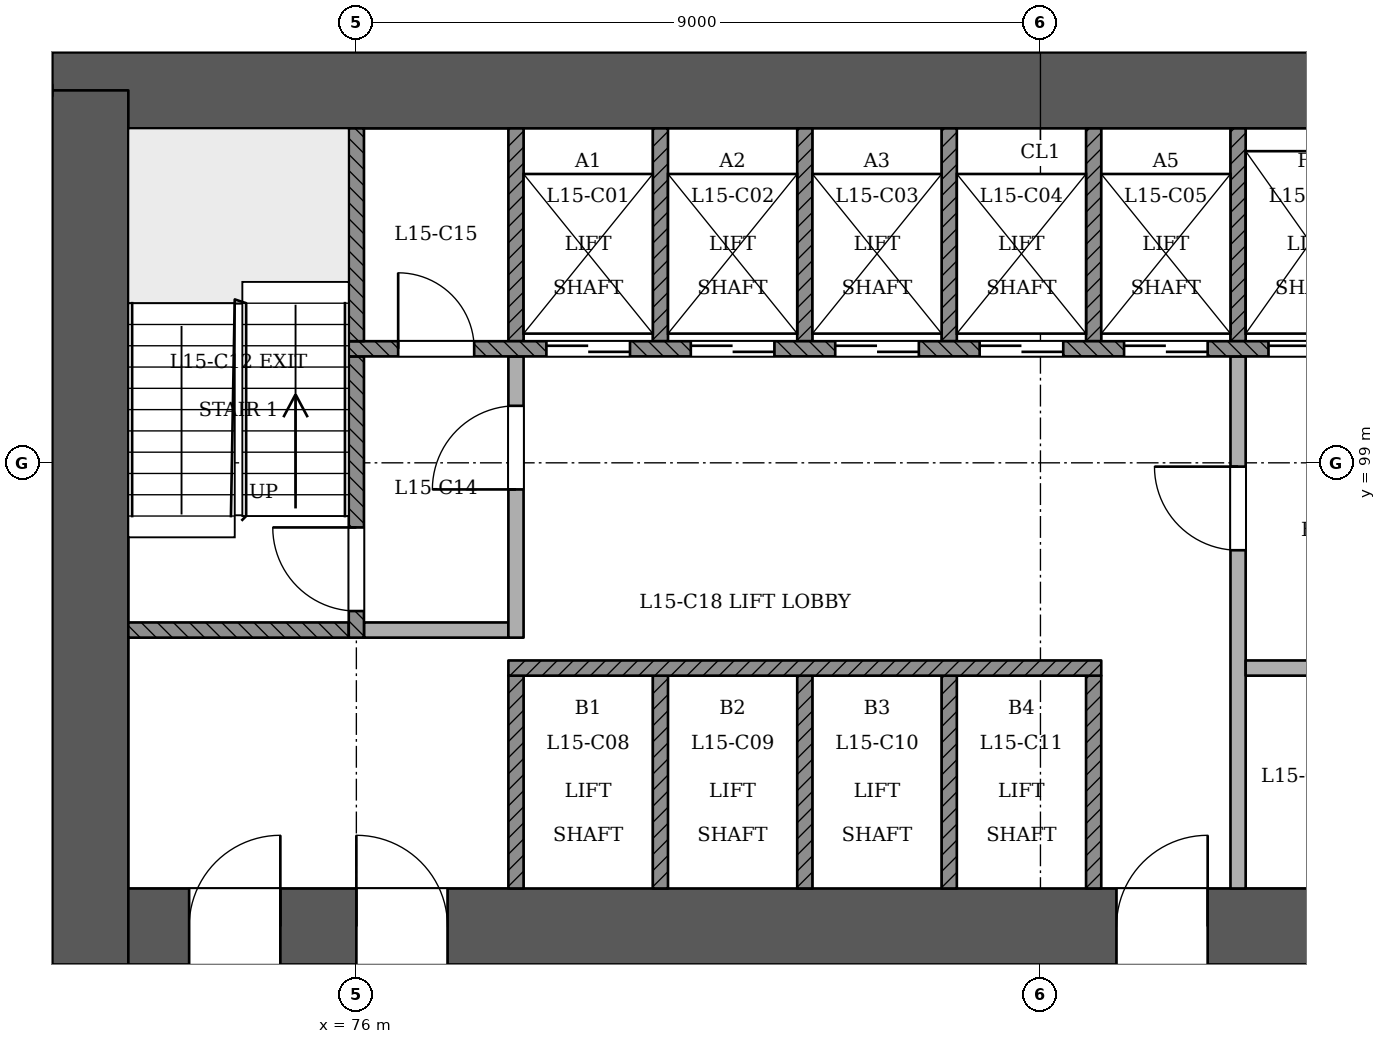
"""IFC4 building model, lengths in metres.
Left out: names, types, materials, properties, quantities, classifications, styles, units other than length and angle.
Written with IfcOpenShell. Run it as: python <this file> out.ifc"""

import sys

from ifc_helpers import new_model, si_unit, direction, frame, frame_2d, origin, place, context, subcontext, project, spatial, rectangle, extrude, element, fill, save


model = new_model("IFC4")
c1 = context("Model", 3, precision=1e-05, world=origin(), true_north=direction((0.0, 1.0)))
c2 = subcontext(c1, "Body", "Model", "MODEL_VIEW")
j1 = project(units=[si_unit("LENGTHUNIT", "METRE"), si_unit("PLANEANGLEUNIT", "RADIAN")], contexts=[c1])
p1 = place(None, origin())
s1 = spatial("IfcSite", under=j1, at=p1, CompositionType="ELEMENT")
p2 = place(p1, origin())
s2 = spatial("IfcBuilding", under=s1, at=p2, CompositionType="ELEMENT")
p3 = place(p2, frame((0.0, 0.0, 63.0)))
s3 = spatial("IfcBuildingStorey", under=s2, at=p3, CompositionType="ELEMENT", Elevation=63.0)
p4 = place(p3, frame((72.5, 92.9, 0.0), z_axis=(0.0, 0.0, 1.0), x_axis=(1.0, 0.0, 0.0)))
e1 = element("IfcWall", 1, at=p4, inside=s3, PredefinedType="SHEAR", context=c2, shape_type="SweptSolid", body=[
    extrude(rectangle(XDim=25.5, YDim=1.0, at=frame_2d((12.75, 0.0))), origin(), (0.0, 0.0, 1.0), 3.6),
])
p5 = place(p4, frame((1.3, 0.0, 0.0)))
e2 = element("IfcOpeningElement", 2, at=p5, cuts=e1, PredefinedType="OPENING", context=c2, shape_type="SweptSolid", body=[
    extrude(rectangle(XDim=1.2, YDim=2.1, at=frame_2d((0.6, 1.05))), frame((0.0, 0.51, 0.0), z_axis=(0.0, -1.0, 0.0), x_axis=(1.0, 0.0, 0.0)), (0.0, 0.0, 1.0), 1.021),
])
p6 = place(p4, frame((3.5, 0.0, 0.0)))
e3 = element("IfcOpeningElement", 3, at=p6, cuts=e1, PredefinedType="OPENING", context=c2, shape_type="SweptSolid", body=[
    extrude(rectangle(XDim=1.2, YDim=2.1, at=frame_2d((0.6, 1.05))), frame((0.0, 0.51, 0.0), z_axis=(0.0, -1.0, 0.0), x_axis=(1.0, 0.0, 0.0)), (0.0, 0.0, 1.0), 1.021),
])
p7 = place(p4, frame((13.5, 0.0, 0.0)))
e4 = element("IfcOpeningElement", 4, at=p7, cuts=e1, PredefinedType="OPENING", context=c2, shape_type="SweptSolid", body=[
    extrude(rectangle(XDim=1.2, YDim=2.1, at=frame_2d((0.6, 1.05))), frame((0.0, 0.51, 0.0), z_axis=(0.0, -1.0, 0.0), x_axis=(1.0, 0.0, 0.0)), (0.0, 0.0, 1.0), 1.021),
])
p8 = place(p4, frame((16.363, 0.0, 0.0)))
e5 = element("IfcOpeningElement", 5, at=p8, cuts=e1, PredefinedType="OPENING", context=c2, shape_type="SweptSolid", body=[
    extrude(rectangle(XDim=1.0, YDim=2.1, at=frame_2d((0.5, 1.05))), frame((0.0, 0.51, 0.0), z_axis=(0.0, -1.0, 0.0), x_axis=(1.0, 0.0, 0.0)), (0.0, 0.0, 1.0), 1.021),
])
p9 = place(p4, frame((19.8, 0.0, 0.0)))
e6 = element("IfcOpeningElement", 6, at=p9, cuts=e1, PredefinedType="OPENING", context=c2, shape_type="SweptSolid", body=[
    extrude(rectangle(XDim=1.0, YDim=2.1, at=frame_2d((0.5, 1.05))), frame((0.0, 0.51, 0.0), z_axis=(0.0, -1.0, 0.0), x_axis=(1.0, 0.0, 0.0)), (0.0, 0.0, 1.0), 1.021),
])
p10 = place(p4, frame((22.788, 0.0, 0.0)))
e7 = element("IfcOpeningElement", 7, at=p10, cuts=e1, PredefinedType="OPENING", context=c2, shape_type="SweptSolid", body=[
    extrude(rectangle(XDim=1.0, YDim=2.1, at=frame_2d((0.5, 1.05))), frame((0.0, 0.51, 0.0), z_axis=(0.0, -1.0, 0.0), x_axis=(1.0, 0.0, 0.0)), (0.0, 0.0, 1.0), 1.021),
])
p11 = place(p3, frame((97.5, 103.9, 0.0), z_axis=(0.0, 0.0, 1.0), x_axis=(-1.0, 0.0, 0.0)))
e8 = element("IfcWall", 8, at=p11, inside=s3, PredefinedType="SHEAR", context=c2, shape_type="SweptSolid", body=[
    extrude(rectangle(XDim=25.5, YDim=1.0, at=frame_2d((12.75, 0.0))), origin(), (0.0, 0.0, 1.0), 3.6),
])
p12 = place(p3, frame((72.5, 103.9, 0.0), z_axis=(0.0, 0.0, 1.0), x_axis=(0.0, -1.0, 0.0)))
e9 = element("IfcWall", 9, at=p12, inside=s3, PredefinedType="SHEAR", context=c2, shape_type="SweptSolid", body=[
    extrude(rectangle(XDim=11.5, YDim=1.0, at=frame_2d((5.75, 0.0))), origin(), (0.0, 0.0, 1.0), 3.6),
])
p13 = place(p3, frame((62.347, 97.006, 0.0), z_axis=(0.0, 0.0, 1.0), x_axis=(0.500001772576, -0.866024380385, 0.0)))
e10 = element("IfcWall", 10, at=p13, inside=s3, PredefinedType="PARTITIONING", context=c2, shape_type="SweptSolid", body=[
    extrude(rectangle(XDim=43.58, YDim=0.15, at=frame_2d((21.79, 0.0))), origin(), (0.0, 0.0, 1.0), 2.7),
])
p14 = place(p13, frame((3.55, 0.0, 0.0)))
e11 = element("IfcOpeningElement", 11, at=p14, cuts=e10, PredefinedType="OPENING", context=c2, shape_type="SweptSolid", body=[
    extrude(rectangle(XDim=1.2, YDim=2.1, at=frame_2d((0.6, 1.05))), frame((0.0, 0.085, 0.0), z_axis=(0.0, -1.0, 0.0), x_axis=(1.0, 0.0, 0.0)), (0.0, 0.0, 1.0), 0.171),
])
p15 = place(p13, frame((12.19, 0.0, 0.0)))
e12 = element("IfcOpeningElement", 12, at=p15, cuts=e10, PredefinedType="OPENING", context=c2, shape_type="SweptSolid", body=[
    extrude(rectangle(XDim=1.2, YDim=2.1, at=frame_2d((0.6, 1.05))), frame((0.0, 0.085, 0.0), z_axis=(0.0, -1.0, 0.0), x_axis=(1.0, 0.0, 0.0)), (0.0, 0.0, 1.0), 0.171),
])
p16 = place(p13, frame((19.04, 0.0, 0.0)))
e13 = element("IfcOpeningElement", 13, at=p16, cuts=e10, PredefinedType="OPENING", context=c2, shape_type="SweptSolid", body=[
    extrude(rectangle(XDim=1.0, YDim=2.1, at=frame_2d((0.5, 1.05))), frame((0.0, 0.085, 0.0), z_axis=(0.0, -1.0, 0.0), x_axis=(1.0, 0.0, 0.0)), (0.0, 0.0, 1.0), 0.171),
])
p17 = place(p13, frame((27.94, 0.0, 0.0)))
e14 = element("IfcOpeningElement", 14, at=p17, cuts=e10, PredefinedType="OPENING", context=c2, shape_type="SweptSolid", body=[
    extrude(rectangle(XDim=1.2, YDim=2.1, at=frame_2d((0.6, 1.05))), frame((0.0, 0.085, 0.0), z_axis=(0.0, -1.0, 0.0), x_axis=(1.0, 0.0, 0.0)), (0.0, 0.0, 1.0), 0.171),
])
p18 = place(p13, frame((38.831, 0.0, 0.0)))
e15 = element("IfcOpeningElement", 15, at=p18, cuts=e10, PredefinedType="OPENING", context=c2, shape_type="SweptSolid", body=[
    extrude(rectangle(XDim=1.2, YDim=2.1, at=frame_2d((0.6, 1.05))), frame((0.0, 0.085, 0.0), z_axis=(0.0, -1.0, 0.0), x_axis=(1.0, 0.0, 0.0)), (0.0, 0.0, 1.0), 0.171),
])
p19 = place(p3, frame((85.862, 59.265, 0.0), z_axis=(0.0, 0.0, 1.0), x_axis=(0.500001772576, 0.866024380385, 0.0)))
e16 = element("IfcWall", 16, at=p19, inside=s3, PredefinedType="PARTITIONING", context=c2, shape_type="SweptSolid", body=[
    extrude(rectangle(XDim=43.58, YDim=0.15, at=frame_2d((21.79, 0.0))), origin(), (0.0, 0.0, 1.0), 2.7),
])
p20 = place(p19, frame((3.55, 0.0, 0.0)))
e17 = element("IfcOpeningElement", 17, at=p20, cuts=e16, PredefinedType="OPENING", context=c2, shape_type="SweptSolid", body=[
    extrude(rectangle(XDim=1.2, YDim=2.1, at=frame_2d((0.6, 1.05))), frame((0.0, 0.085, 0.0), z_axis=(0.0, -1.0, 0.0), x_axis=(1.0, 0.0, 0.0)), (0.0, 0.0, 1.0), 0.171),
])
p21 = place(p19, frame((14.44, 0.0, 0.0)))
e18 = element("IfcOpeningElement", 18, at=p21, cuts=e16, PredefinedType="OPENING", context=c2, shape_type="SweptSolid", body=[
    extrude(rectangle(XDim=1.2, YDim=2.1, at=frame_2d((0.6, 1.05))), frame((0.0, 0.085, 0.0), z_axis=(0.0, -1.0, 0.0), x_axis=(1.0, 0.0, 0.0)), (0.0, 0.0, 1.0), 0.171),
])
p22 = place(p19, frame((27.94, 0.0, 0.0)))
e19 = element("IfcOpeningElement", 19, at=p22, cuts=e16, PredefinedType="OPENING", context=c2, shape_type="SweptSolid", body=[
    extrude(rectangle(XDim=1.2, YDim=2.1, at=frame_2d((0.6, 1.05))), frame((0.0, 0.085, 0.0), z_axis=(0.0, -1.0, 0.0), x_axis=(1.0, 0.0, 0.0)), (0.0, 0.0, 1.0), 0.171),
])
p23 = place(p19, frame((38.831, 0.0, 0.0)))
e20 = element("IfcOpeningElement", 20, at=p23, cuts=e16, PredefinedType="OPENING", context=c2, shape_type="SweptSolid", body=[
    extrude(rectangle(XDim=1.2, YDim=2.1, at=frame_2d((0.6, 1.05))), frame((0.0, 0.085, 0.0), z_axis=(0.0, -1.0, 0.0), x_axis=(1.0, 0.0, 0.0)), (0.0, 0.0, 1.0), 0.171),
])
for number, where, z_axis, x_axis in (
    (21, (78.1, 93.4, 0.0), (0.0, 0.0, 1.0), (0.0, 1.0, 0.0)),
    (22, (80.0, 93.4, 0.0), (0.0, 0.0, 1.0), (0.0, 1.0, 0.0)),
    (23, (81.9, 93.4, 0.0), (0.0, 0.0, 1.0), (0.0, 1.0, 0.0)),
    (24, (83.8, 93.4, 0.0), (0.0, 0.0, 1.0), (0.0, 1.0, 0.0)),
    (25, (85.7, 93.4, 0.0), (0.0, 0.0, 1.0), (0.0, 1.0, 0.0)),
):
    element("IfcWall", number, at=place(p3, frame(where, z_axis=z_axis, x_axis=x_axis)), inside=s3, PredefinedType="SOLIDWALL", context=c2, shape_type="SweptSolid", body=[
        extrude(rectangle(XDim=2.8, YDim=0.2, at=frame_2d((1.4, 0.0))), origin(), (0.0, 0.0, 1.0), 3.1),
    ])
p24 = place(p3, frame((87.6, 93.4, 0.0), z_axis=(0.0, 0.0, 1.0), x_axis=(0.0, 1.0, 0.0)))
e26 = element("IfcWall", 26, at=p24, inside=s3, PredefinedType="PARTITIONING", context=c2, shape_type="SweptSolid", body=[
    extrude(rectangle(XDim=7.0, YDim=0.2, at=frame_2d((3.5, 0.0))), origin(), (0.0, 0.0, 1.0), 3.1),
])
p25 = place(p24, frame((4.45, 0.0, 0.0)))
e27 = element("IfcOpeningElement", 27, at=p25, cuts=e26, PredefinedType="OPENING", context=c2, shape_type="SweptSolid", body=[
    extrude(rectangle(XDim=1.1, YDim=2.1, at=frame_2d((0.55, 1.05))), frame((0.0, 0.11, 0.0), z_axis=(0.0, -1.0, 0.0), x_axis=(1.0, 0.0, 0.0)), (0.0, 0.0, 1.0), 0.221),
])
p26 = place(p3, frame((78.0, 96.3, 0.0), z_axis=(0.0, 0.0, 1.0), x_axis=(1.0, 0.0, 0.0)))
e28 = element("IfcWall", 28, at=p26, inside=s3, PredefinedType="SOLIDWALL", context=c2, shape_type="SweptSolid", body=[
    extrude(rectangle(XDim=7.8, YDim=0.2, at=frame_2d((3.9, 0.0))), origin(), (0.0, 0.0, 1.0), 3.1),
])
p27 = place(p3, frame((87.7, 96.3, 0.0), z_axis=(0.0, 0.0, 1.0), x_axis=(1.0, 0.0, 0.0)))
e29 = element("IfcWall", 29, at=p27, inside=s3, PredefinedType="PARTITIONING", context=c2, shape_type="SweptSolid", body=[
    extrude(rectangle(XDim=3.6, YDim=0.2, at=frame_2d((1.8, 0.0))), origin(), (0.0, 0.0, 1.0), 3.1),
])
p28 = place(p3, frame((73.0, 96.8, 0.0), z_axis=(0.0, 0.0, 1.0), x_axis=(1.0, 0.0, 0.0)))
e30 = element("IfcWall", 30, at=p28, inside=s3, PredefinedType="SOLIDWALL", context=c2, shape_type="SweptSolid", body=[
    extrude(rectangle(XDim=2.9, YDim=0.2, at=frame_2d((1.45, 0.0))), origin(), (0.0, 0.0, 1.0), 3.1),
])
p29 = place(p3, frame((76.0, 96.7, 0.0), z_axis=(0.0, 0.0, 1.0), x_axis=(0.0, 1.0, 0.0)))
e31 = element("IfcWall", 31, at=p29, inside=s3, PredefinedType="SOLIDWALL", context=c2, shape_type="SweptSolid", body=[
    extrude(rectangle(XDim=3.7, YDim=0.2, at=frame_2d((1.85, 0.0))), origin(), (0.0, 0.0, 1.0), 3.1),
])
p30 = place(p29, frame((0.35, 0.0, 0.0)))
e32 = element("IfcOpeningElement", 32, at=p30, cuts=e31, PredefinedType="OPENING", context=c2, shape_type="SweptSolid", body=[
    extrude(rectangle(XDim=1.1, YDim=2.1, at=frame_2d((0.55, 1.05))), frame((0.0, 0.11, 0.0), z_axis=(0.0, -1.0, 0.0), x_axis=(1.0, 0.0, 0.0)), (0.0, 0.0, 1.0), 0.221),
])
p31 = place(p3, frame((76.1, 96.8, 0.0), z_axis=(0.0, 0.0, 1.0), x_axis=(1.0, 0.0, 0.0)))
e33 = element("IfcWall", 33, at=p31, inside=s3, PredefinedType="PARTITIONING", context=c2, shape_type="SweptSolid", body=[
    extrude(rectangle(XDim=1.9, YDim=0.2, at=frame_2d((0.95, 0.0))), origin(), (0.0, 0.0, 1.0), 3.1),
])
p32 = place(p3, frame((78.1, 96.7, 0.0), z_axis=(0.0, 0.0, 1.0), x_axis=(0.0, 1.0, 0.0)))
e34 = element("IfcWall", 34, at=p32, inside=s3, PredefinedType="PARTITIONING", context=c2, shape_type="SweptSolid", body=[
    extrude(rectangle(XDim=3.7, YDim=0.2, at=frame_2d((1.85, 0.0))), origin(), (0.0, 0.0, 1.0), 3.1),
])
p33 = place(p32, frame((1.95, 0.0, 0.0)))
e35 = element("IfcOpeningElement", 35, at=p33, cuts=e34, PredefinedType="OPENING", context=c2, shape_type="SweptSolid", body=[
    extrude(rectangle(XDim=1.1, YDim=2.1, at=frame_2d((0.55, 1.05))), frame((0.0, 0.11, 0.0), z_axis=(0.0, -1.0, 0.0), x_axis=(1.0, 0.0, 0.0)), (0.0, 0.0, 1.0), 0.221),
])
p34 = place(p3, frame((75.9, 100.5, 0.0), z_axis=(0.0, 0.0, 1.0), x_axis=(1.0, 0.0, 0.0)))
e36 = element("IfcWall", 36, at=p34, inside=s3, PredefinedType="SOLIDWALL", context=c2, shape_type="SweptSolid", body=[
    extrude(rectangle(XDim=18.2, YDim=0.2, at=frame_2d((9.1, 0.0))), origin(), (0.0, 0.0, 1.0), 3.1),
])
p35 = place(p34, frame((2.6, 0.0, 0.0)))
e37 = element("IfcOpeningElement", 37, at=p35, cuts=e36, PredefinedType="OPENING", context=c2, shape_type="SweptSolid", body=[
    extrude(rectangle(XDim=1.1, YDim=2.1, at=frame_2d((0.55, 1.05))), frame((0.0, 0.11, 0.0), z_axis=(0.0, -1.0, 0.0), x_axis=(1.0, 0.0, 0.0)), (0.0, 0.0, 1.0), 0.221),
])
p36 = place(p34, frame((4.5, 0.0, 0.0)))
e38 = element("IfcOpeningElement", 38, at=p36, cuts=e36, PredefinedType="OPENING", context=c2, shape_type="SweptSolid", body=[
    extrude(rectangle(XDim=1.1, YDim=2.1, at=frame_2d((0.55, 1.05))), frame((0.0, 0.11, 0.0), z_axis=(0.0, -1.0, 0.0), x_axis=(1.0, 0.0, 0.0)), (0.0, 0.0, 1.0), 0.221),
])
p37 = place(p34, frame((6.4, 0.0, 0.0)))
e39 = element("IfcOpeningElement", 39, at=p37, cuts=e36, PredefinedType="OPENING", context=c2, shape_type="SweptSolid", body=[
    extrude(rectangle(XDim=1.1, YDim=2.1, at=frame_2d((0.55, 1.05))), frame((0.0, 0.11, 0.0), z_axis=(0.0, -1.0, 0.0), x_axis=(1.0, 0.0, 0.0)), (0.0, 0.0, 1.0), 0.221),
])
p38 = place(p34, frame((8.3, 0.0, 0.0)))
e40 = element("IfcOpeningElement", 40, at=p38, cuts=e36, PredefinedType="OPENING", context=c2, shape_type="SweptSolid", body=[
    extrude(rectangle(XDim=1.1, YDim=2.1, at=frame_2d((0.55, 1.05))), frame((0.0, 0.11, 0.0), z_axis=(0.0, -1.0, 0.0), x_axis=(1.0, 0.0, 0.0)), (0.0, 0.0, 1.0), 0.221),
])
p39 = place(p34, frame((10.2, 0.0, 0.0)))
e41 = element("IfcOpeningElement", 41, at=p39, cuts=e36, PredefinedType="OPENING", context=c2, shape_type="SweptSolid", body=[
    extrude(rectangle(XDim=1.1, YDim=2.1, at=frame_2d((0.55, 1.05))), frame((0.0, 0.11, 0.0), z_axis=(0.0, -1.0, 0.0), x_axis=(1.0, 0.0, 0.0)), (0.0, 0.0, 1.0), 0.221),
])
p40 = place(p34, frame((12.1, 0.0, 0.0)))
e42 = element("IfcOpeningElement", 42, at=p40, cuts=e36, PredefinedType="OPENING", context=c2, shape_type="SweptSolid", body=[
    extrude(rectangle(XDim=1.1, YDim=2.1, at=frame_2d((0.55, 1.05))), frame((0.0, 0.11, 0.0), z_axis=(0.0, -1.0, 0.0), x_axis=(1.0, 0.0, 0.0)), (0.0, 0.0, 1.0), 0.221),
])
p41 = place(p34, frame((14.0, 0.0, 0.0)))
e43 = element("IfcOpeningElement", 43, at=p41, cuts=e36, PredefinedType="OPENING", context=c2, shape_type="SweptSolid", body=[
    extrude(rectangle(XDim=1.1, YDim=2.1, at=frame_2d((0.55, 1.05))), frame((0.0, 0.11, 0.0), z_axis=(0.0, -1.0, 0.0), x_axis=(1.0, 0.0, 0.0)), (0.0, 0.0, 1.0), 0.221),
])
p42 = place(p34, frame((0.65, 0.0, 0.0)))
e44 = element("IfcOpeningElement", 44, at=p42, cuts=e36, PredefinedType="OPENING", context=c2, shape_type="SweptSolid", body=[
    extrude(rectangle(XDim=1.0, YDim=2.1, at=frame_2d((0.5, 1.05))), frame((0.0, 0.11, 0.0), z_axis=(0.0, -1.0, 0.0), x_axis=(1.0, 0.0, 0.0)), (0.0, 0.0, 1.0), 0.221),
])
p43 = place(p34, frame((16.3, 0.0, 0.0)))
e45 = element("IfcOpeningElement", 45, at=p43, cuts=e36, PredefinedType="OPENING", context=c2, shape_type="SweptSolid", body=[
    extrude(rectangle(XDim=1.0, YDim=2.1, at=frame_2d((0.5, 1.05))), frame((0.0, 0.11, 0.0), z_axis=(0.0, -1.0, 0.0), x_axis=(1.0, 0.0, 0.0)), (0.0, 0.0, 1.0), 0.221),
])
for number, where, z_axis, x_axis in (
    (46, (76.0, 100.6, 0.0), (0.0, 0.0, 1.0), (0.0, 1.0, 0.0)),
    (47, (78.1, 100.6, 0.0), (0.0, 0.0, 1.0), (0.0, 1.0, 0.0)),
    (48, (80.0, 100.6, 0.0), (0.0, 0.0, 1.0), (0.0, 1.0, 0.0)),
    (49, (81.9, 100.6, 0.0), (0.0, 0.0, 1.0), (0.0, 1.0, 0.0)),
    (50, (83.8, 100.6, 0.0), (0.0, 0.0, 1.0), (0.0, 1.0, 0.0)),
    (51, (85.7, 100.6, 0.0), (0.0, 0.0, 1.0), (0.0, 1.0, 0.0)),
    (52, (87.6, 100.6, 0.0), (0.0, 0.0, 1.0), (0.0, 1.0, 0.0)),
):
    element("IfcWall", number, at=place(p3, frame(where, z_axis=z_axis, x_axis=x_axis)), inside=s3, PredefinedType="SOLIDWALL", context=c2, shape_type="SweptSolid", body=[
        extrude(rectangle(XDim=2.8, YDim=0.2, at=frame_2d((1.4, 0.0))), origin(), (0.0, 0.0, 1.0), 3.1),
    ])
p44 = place(p35, origin())
e53 = element("IfcDoor", 53, at=p44, inside=s3, OperationType="SLIDING_TO_RIGHT", PredefinedType="NOTDEFINED", context=c2, shape_type="SweptSolid", body=[
    extrude(rectangle(XDim=1.1, YDim=2.1, at=frame_2d((0.55, 1.05))), frame((0.0, 0.025, 0.0), z_axis=(0.0, -1.0, 0.0), x_axis=(1.0, 0.0, 0.0)), (0.0, 0.0, 1.0), 0.05),
])
fill(e37, e53)
p45 = place(p36, origin())
e54 = element("IfcDoor", 54, at=p45, inside=s3, OperationType="SLIDING_TO_LEFT", PredefinedType="NOTDEFINED", context=c2, shape_type="SweptSolid", body=[
    extrude(rectangle(XDim=1.1, YDim=2.1, at=frame_2d((0.55, 1.05))), frame((0.0, 0.025, 0.0), z_axis=(0.0, -1.0, 0.0), x_axis=(1.0, 0.0, 0.0)), (0.0, 0.0, 1.0), 0.05),
])
fill(e38, e54)
p46 = place(p37, origin())
e55 = element("IfcDoor", 55, at=p46, inside=s3, OperationType="SLIDING_TO_RIGHT", PredefinedType="NOTDEFINED", context=c2, shape_type="SweptSolid", body=[
    extrude(rectangle(XDim=1.1, YDim=2.1, at=frame_2d((0.55, 1.05))), frame((0.0, 0.025, 0.0), z_axis=(0.0, -1.0, 0.0), x_axis=(1.0, 0.0, 0.0)), (0.0, 0.0, 1.0), 0.05),
])
fill(e39, e55)
p47 = place(p38, origin())
e56 = element("IfcDoor", 56, at=p47, inside=s3, OperationType="SLIDING_TO_LEFT", PredefinedType="NOTDEFINED", context=c2, shape_type="SweptSolid", body=[
    extrude(rectangle(XDim=1.1, YDim=2.1, at=frame_2d((0.55, 1.05))), frame((0.0, 0.025, 0.0), z_axis=(0.0, -1.0, 0.0), x_axis=(1.0, 0.0, 0.0)), (0.0, 0.0, 1.0), 0.05),
])
fill(e40, e56)
p48 = place(p39, origin())
e57 = element("IfcDoor", 57, at=p48, inside=s3, OperationType="SLIDING_TO_RIGHT", PredefinedType="NOTDEFINED", context=c2, shape_type="SweptSolid", body=[
    extrude(rectangle(XDim=1.1, YDim=2.1, at=frame_2d((0.55, 1.05))), frame((0.0, 0.025, 0.0), z_axis=(0.0, -1.0, 0.0), x_axis=(1.0, 0.0, 0.0)), (0.0, 0.0, 1.0), 0.05),
])
fill(e41, e57)
p49 = place(p40, origin())
e58 = element("IfcDoor", 58, at=p49, inside=s3, OperationType="SLIDING_TO_RIGHT", PredefinedType="NOTDEFINED", context=c2, shape_type="SweptSolid", body=[
    extrude(rectangle(XDim=1.1, YDim=2.1, at=frame_2d((0.55, 1.05))), frame((0.0, 0.025, 0.0), z_axis=(0.0, -1.0, 0.0), x_axis=(1.0, 0.0, 0.0)), (0.0, 0.0, 1.0), 0.05),
])
fill(e42, e58)
p50 = place(p30, origin())
e59 = element("IfcDoor", 59, at=p50, inside=s3, OperationType="SINGLE_SWING_RIGHT", PredefinedType="NOTDEFINED", context=c2, shape_type="SweptSolid", body=[
    extrude(rectangle(XDim=1.1, YDim=2.1, at=frame_2d((0.55, 1.05))), frame((0.0, 0.025, 0.0), z_axis=(0.0, -1.0, 0.0), x_axis=(1.0, 0.0, 0.0)), (0.0, 0.0, 1.0), 0.05),
])
fill(e32, e59)
p51 = place(p33, origin())
e60 = element("IfcDoor", 60, at=p51, inside=s3, OperationType="SINGLE_SWING_LEFT", PredefinedType="NOTDEFINED", context=c2, shape_type="SweptSolid", body=[
    extrude(rectangle(XDim=1.1, YDim=2.1, at=frame_2d((0.55, 1.05))), frame((0.0, 0.025, 0.0), z_axis=(0.0, -1.0, 0.0), x_axis=(1.0, 0.0, 0.0)), (0.0, 0.0, 1.0), 0.05),
])
fill(e35, e60)
p52 = place(p25, origin())
e61 = element("IfcDoor", 61, at=p52, inside=s3, OperationType="SINGLE_SWING_RIGHT", PredefinedType="NOTDEFINED", context=c2, shape_type="SweptSolid", body=[
    extrude(rectangle(XDim=1.1, YDim=2.1, at=frame_2d((0.55, 1.05))), frame((0.0, 0.025, 0.0), z_axis=(0.0, -1.0, 0.0), x_axis=(1.0, 0.0, 0.0)), (0.0, 0.0, 1.0), 0.05),
])
fill(e27, e61)
p53 = place(p5, origin())
e62 = element("IfcDoor", 62, at=p53, inside=s3, OperationType="SINGLE_SWING_RIGHT", PredefinedType="NOTDEFINED", context=c2, shape_type="SweptSolid", body=[
    extrude(rectangle(XDim=1.2, YDim=2.1, at=frame_2d((0.6, 1.05))), frame((0.0, 0.025, 0.0), z_axis=(0.0, -1.0, 0.0), x_axis=(1.0, 0.0, 0.0)), (0.0, 0.0, 1.0), 0.05),
])
fill(e2, e62)
p54 = place(p6, origin())
e63 = element("IfcDoor", 63, at=p54, inside=s3, OperationType="SINGLE_SWING_LEFT", PredefinedType="NOTDEFINED", context=c2, shape_type="SweptSolid", body=[
    extrude(rectangle(XDim=1.2, YDim=2.1, at=frame_2d((0.6, 1.05))), frame((0.0, 0.025, 0.0), z_axis=(0.0, -1.0, 0.0), x_axis=(1.0, 0.0, 0.0)), (0.0, 0.0, 1.0), 0.05),
])
fill(e3, e63)
p55 = place(p7, origin())
e64 = element("IfcDoor", 64, at=p55, inside=s3, OperationType="SINGLE_SWING_RIGHT", PredefinedType="NOTDEFINED", context=c2, shape_type="SweptSolid", body=[
    extrude(rectangle(XDim=1.2, YDim=2.1, at=frame_2d((0.6, 1.05))), frame((0.0, 0.025, 0.0), z_axis=(0.0, -1.0, 0.0), x_axis=(1.0, 0.0, 0.0)), (0.0, 0.0, 1.0), 0.05),
])
fill(e4, e64)
p56 = place(p42, origin())
e65 = element("IfcDoor", 65, at=p56, inside=s3, OperationType="SINGLE_SWING_LEFT", PredefinedType="NOTDEFINED", context=c2, shape_type="SweptSolid", body=[
    extrude(rectangle(XDim=1.0, YDim=2.1, at=frame_2d((0.5, 1.05))), frame((0.0, 0.025, 0.0), z_axis=(0.0, -1.0, 0.0), x_axis=(1.0, 0.0, 0.0)), (0.0, 0.0, 1.0), 0.05),
])
fill(e44, e65)
save(model, sys.argv[1])
